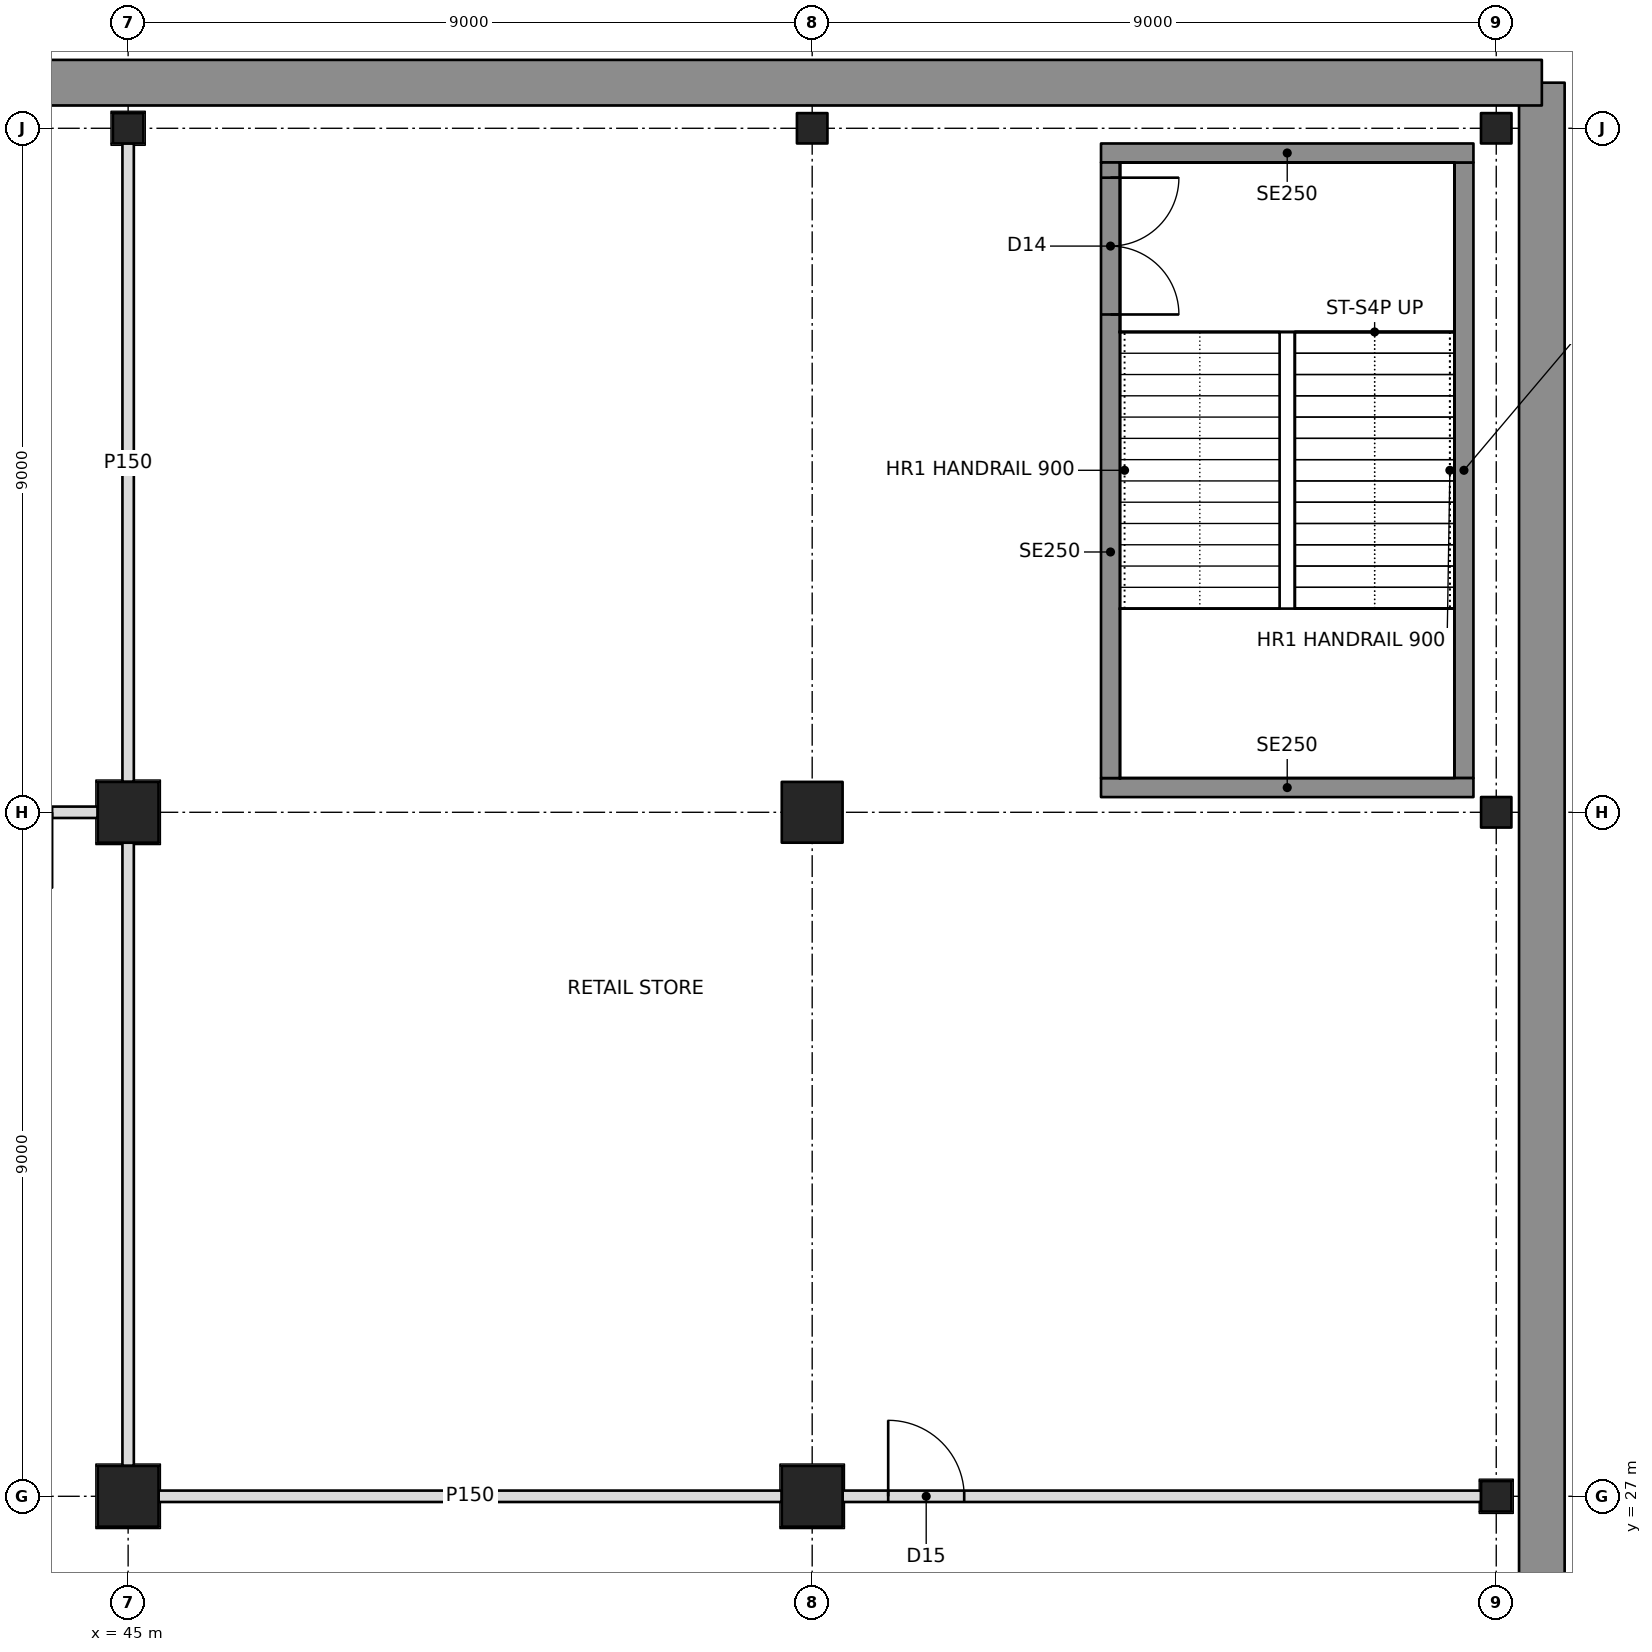
"""IFC4 building model, lengths in metres.
Left out: names, types, materials, properties, quantities, classifications, styles, units other than length and angle.
Written with IfcOpenShell. Run it as: python <this file> out.ifc"""

import sys

from ifc_helpers import new_model, si_unit, direction, frame, frame_2d, origin, origin_2d, place, context, subcontext, project, spatial, rectangle, hollow_rectangle, i_section, extrude, element, fill, save


model = new_model("IFC4")
c1 = context("Model", 3, precision=1e-05, world=origin(), true_north=direction((0.0, 1.0)))
c2 = subcontext(c1, "Body", "Model", "MODEL_VIEW")
j1 = project(units=[si_unit("LENGTHUNIT", "METRE"), si_unit("PLANEANGLEUNIT", "RADIAN")], contexts=[c1])
p1 = place(None, origin())
s1 = spatial("IfcSite", under=j1, at=p1, CompositionType="ELEMENT")
p2 = place(p1, origin())
s2 = spatial("IfcBuilding", under=s1, at=p2, CompositionType="ELEMENT")
p3 = place(p2, frame((0.0, 0.0, -5.5)))
s3 = spatial("IfcBuildingStorey", under=s2, at=p3, CompositionType="ELEMENT", Elevation=-5.5)
for number, where, z_axis, x_axis in (
    (1, (45.0, 27.0, 0.0), (0.0, 0.0, 1.0), (0.0, 1.0, 0.0)),
    (2, (45.0, 36.0, 0.0), (0.0, 0.0, 1.0), (1.0, 0.0, 0.0)),
):
    element("IfcColumn", number, at=place(p3, frame(where, z_axis=z_axis, x_axis=x_axis)), inside=s3, PredefinedType="COLUMN", context=c2, shape_type="SweptSolid", body=[
        extrude(hollow_rectangle(XDim=0.8, YDim=0.8, WallThickness=0.1, at=origin_2d()), origin(), (0.0, 0.0, 1.0), 5.5),
    ])
p4 = place(p3, frame((45.0, 45.0, 0.0), z_axis=(0.0, 0.0, 1.0), x_axis=(1.0, 0.0, 0.0)))
e3 = element("IfcColumn", 3, at=p4, inside=s3, PredefinedType="COLUMN", context=c2, shape_type="SweptSolid", body=[
    extrude(i_section(OverallWidth=0.401, OverallDepth=0.399, WebThickness=0.025, FlangeThickness=0.04, at=origin_2d()), origin(), (0.0, 0.0, 1.0), 5.5),
])
for number, where, z_axis, x_axis in (
    (4, (54.0, 27.0, 0.0), (0.0, 0.0, 1.0), (0.0, 1.0, 0.0)),
    (5, (54.0, 36.0, 0.0), (0.0, 0.0, 1.0), (1.0, 0.0, 0.0)),
):
    element("IfcColumn", number, at=place(p3, frame(where, z_axis=z_axis, x_axis=x_axis)), inside=s3, PredefinedType="COLUMN", context=c2, shape_type="SweptSolid", body=[
        extrude(hollow_rectangle(XDim=0.8, YDim=0.8, WallThickness=0.1, at=origin_2d()), origin(), (0.0, 0.0, 1.0), 5.5),
    ])
for number, where, z_axis, x_axis in (
    (6, (54.0, 45.0, 0.0), (0.0, 0.0, 1.0), (1.0, 0.0, 0.0)),
    (7, (63.0, 27.0, 0.0), (0.0, 0.0, 1.0), (0.0, 1.0, 0.0)),
    (8, (63.0, 36.0, 0.0), (0.0, 0.0, 1.0), (0.0, 1.0, 0.0)),
    (9, (63.0, 45.0, 0.0), (0.0, 0.0, 1.0), (1.0, 0.0, 0.0)),
):
    element("IfcColumn", number, at=place(p3, frame(where, z_axis=z_axis, x_axis=x_axis)), inside=s3, PredefinedType="COLUMN", context=c2, shape_type="SweptSolid", body=[
        extrude(i_section(OverallWidth=0.401, OverallDepth=0.399, WebThickness=0.025, FlangeThickness=0.04, at=origin_2d()), origin(), (0.0, 0.0, 1.0), 5.5),
    ])
for number, where, z_axis, x_axis in (
    (10, (63.6, -27.6, -0.3), (0.0, 0.0, 1.0), (0.0, 1.0, 0.0)),
    (11, (63.6, 45.6, -0.3), (0.0, 0.0, 1.0), (-1.0, 0.0, 0.0)),
):
    element("IfcWall", number, at=place(p3, frame(where, z_axis=z_axis, x_axis=x_axis)), inside=s3, PredefinedType="SOLIDWALL", context=c2, shape_type="SweptSolid", body=[
        extrude(rectangle(XDim=73.2, YDim=0.6, at=frame_2d((36.6, 0.0))), origin(), (0.0, 0.0, 1.0), 5.5),
    ])
p5 = place(p3, frame((44.6, 36.0, 0.0), z_axis=(0.0, 0.0, 1.0), x_axis=(-1.0, 0.0, 0.0)))
e12 = element("IfcWall", 12, at=p5, inside=s3, PredefinedType="PARTITIONING", context=c2, shape_type="SweptSolid", body=[
    extrude(rectangle(XDim=2.7, YDim=0.15, at=frame_2d((1.35, 0.0))), origin(), (0.0, 0.0, 1.0), 4.253),
])
p6 = place(p5, frame((0.6, 0.0, 0.0)))
e13 = element("IfcOpeningElement", 13, at=p6, cuts=e12, PredefinedType="OPENING", context=c2, shape_type="SweptSolid", body=[
    extrude(rectangle(XDim=1.0, YDim=2.1, at=frame_2d((0.5, 1.05))), frame((0.0, 0.085, 0.0), z_axis=(0.0, -1.0, 0.0), x_axis=(1.0, 0.0, 0.0)), (0.0, 0.0, 1.0), 0.17),
])
p7 = place(p3, frame((62.801, 27.0, 0.0), z_axis=(0.0, 0.0, 1.0), x_axis=(-1.0, 0.0, 0.0)))
e14 = element("IfcWall", 14, at=p7, inside=s3, PredefinedType="PARTITIONING", context=c2, shape_type="SweptSolid", body=[
    extrude(rectangle(XDim=8.401, YDim=0.15, at=frame_2d((4.2, 0.0))), origin(), (0.0, 0.0, 1.0), 4.253),
])
p8 = place(p7, frame((6.801, 0.0, 0.0)))
e15 = element("IfcOpeningElement", 15, at=p8, cuts=e14, PredefinedType="OPENING", context=c2, shape_type="SweptSolid", body=[
    extrude(rectangle(XDim=1.0, YDim=2.1, at=frame_2d((0.5, 1.05))), frame((0.0, 0.085, 0.0), z_axis=(0.0, -1.0, 0.0), x_axis=(1.0, 0.0, 0.0)), (0.0, 0.0, 1.0), 0.17),
])
for number, where, z_axis, x_axis in (
    (16, (53.6, 27.0, 0.0), (0.0, 0.0, 1.0), (-1.0, 0.0, 0.0)),
    (17, (45.0, 27.4, 0.0), (0.0, 0.0, 1.0), (0.0, 1.0, 0.0)),
):
    element("IfcWall", number, at=place(p3, frame(where, z_axis=z_axis, x_axis=x_axis)), inside=s3, PredefinedType="PARTITIONING", context=c2, shape_type="SweptSolid", body=[
        extrude(rectangle(XDim=8.2, YDim=0.15, at=frame_2d((4.1, 0.0))), origin(), (0.0, 0.0, 1.0), 4.253),
    ])
p9 = place(p3, frame((45.0, 44.801, 0.0), z_axis=(0.0, 0.0, 1.0), x_axis=(0.0, -1.0, 0.0)))
e18 = element("IfcWall", 18, at=p9, inside=s3, PredefinedType="PARTITIONING", context=c2, shape_type="SweptSolid", body=[
    extrude(rectangle(XDim=8.401, YDim=0.15, at=frame_2d((4.2, 0.0))), origin(), (0.0, 0.0, 1.0), 4.253),
])
for number, where, z_axis, x_axis in (
    (19, (57.8, 36.325, 0.0), (0.0, 0.0, 1.0), (1.0, 0.0, 0.0)),
    (20, (57.8, 44.675, 0.0), (0.0, 0.0, 1.0), (1.0, 0.0, 0.0)),
):
    element("IfcWall", number, at=place(p3, frame(where, z_axis=z_axis, x_axis=x_axis)), inside=s3, PredefinedType="SOLIDWALL", context=c2, shape_type="SweptSolid", body=[
        extrude(rectangle(XDim=4.9, YDim=0.25, at=frame_2d((2.45, 0.0))), origin(), (0.0, 0.0, 1.0), 5.2),
    ])
p10 = place(p3, frame((57.925, 36.45, 0.0), z_axis=(0.0, 0.0, 1.0), x_axis=(0.0, 1.0, 0.0)))
e21 = element("IfcWall", 21, at=p10, inside=s3, PredefinedType="SOLIDWALL", context=c2, shape_type="SweptSolid", body=[
    extrude(rectangle(XDim=8.1, YDim=0.25, at=frame_2d((4.05, 0.0))), origin(), (0.0, 0.0, 1.0), 5.2),
])
p11 = place(p10, frame((6.1, 0.0, 0.0)))
e22 = element("IfcOpeningElement", 22, at=p11, cuts=e21, PredefinedType="OPENING", context=c2, shape_type="SweptSolid", body=[
    extrude(rectangle(XDim=1.8, YDim=2.1, at=frame_2d((0.9, 1.05))), frame((0.0, 0.135, 0.0), z_axis=(0.0, -1.0, 0.0), x_axis=(1.0, 0.0, 0.0)), (0.0, 0.0, 1.0), 0.27),
])
p12 = place(p3, frame((62.575, 36.45, 0.0), z_axis=(0.0, 0.0, 1.0), x_axis=(0.0, 1.0, 0.0)))
e23 = element("IfcWall", 23, at=p12, inside=s3, PredefinedType="SOLIDWALL", context=c2, shape_type="SweptSolid", body=[
    extrude(rectangle(XDim=8.1, YDim=0.25, at=frame_2d((4.05, 0.0))), origin(), (0.0, 0.0, 1.0), 5.2),
])
p13 = place(p8, frame((1.0, 0.0, 0.0), z_axis=(0.0, 0.0, 1.0), x_axis=(-1.0, 0.0, 0.0)))
e24 = element("IfcDoor", 24, at=p13, inside=s3, OperationType="SINGLE_SWING_LEFT", PredefinedType="DOOR", context=c2, shape_type="SweptSolid", body=[
    extrude(rectangle(XDim=1.0, YDim=2.1, at=frame_2d((0.5, 1.05))), frame((0.0, 0.025, 0.0), z_axis=(0.0, -1.0, 0.0), x_axis=(1.0, 0.0, 0.0)), (0.0, 0.0, 1.0), 0.05),
])
fill(e15, e24)
p14 = place(p11, frame((1.8, 0.0, 0.0), z_axis=(0.0, 0.0, 1.0), x_axis=(-1.0, 0.0, 0.0)))
e25 = element("IfcDoor", 25, at=p14, inside=s3, OperationType="DOUBLE_DOOR_SINGLE_SWING", PredefinedType="DOOR", context=c2, shape_type="SweptSolid", body=[
    extrude(rectangle(XDim=1.8, YDim=2.1, at=frame_2d((0.9, 1.05))), frame((0.0, 0.025, 0.0), z_axis=(0.0, -1.0, 0.0), x_axis=(1.0, 0.0, 0.0)), (0.0, 0.0, 1.0), 0.05),
])
fill(e22, e25)
save(model, sys.argv[1])
